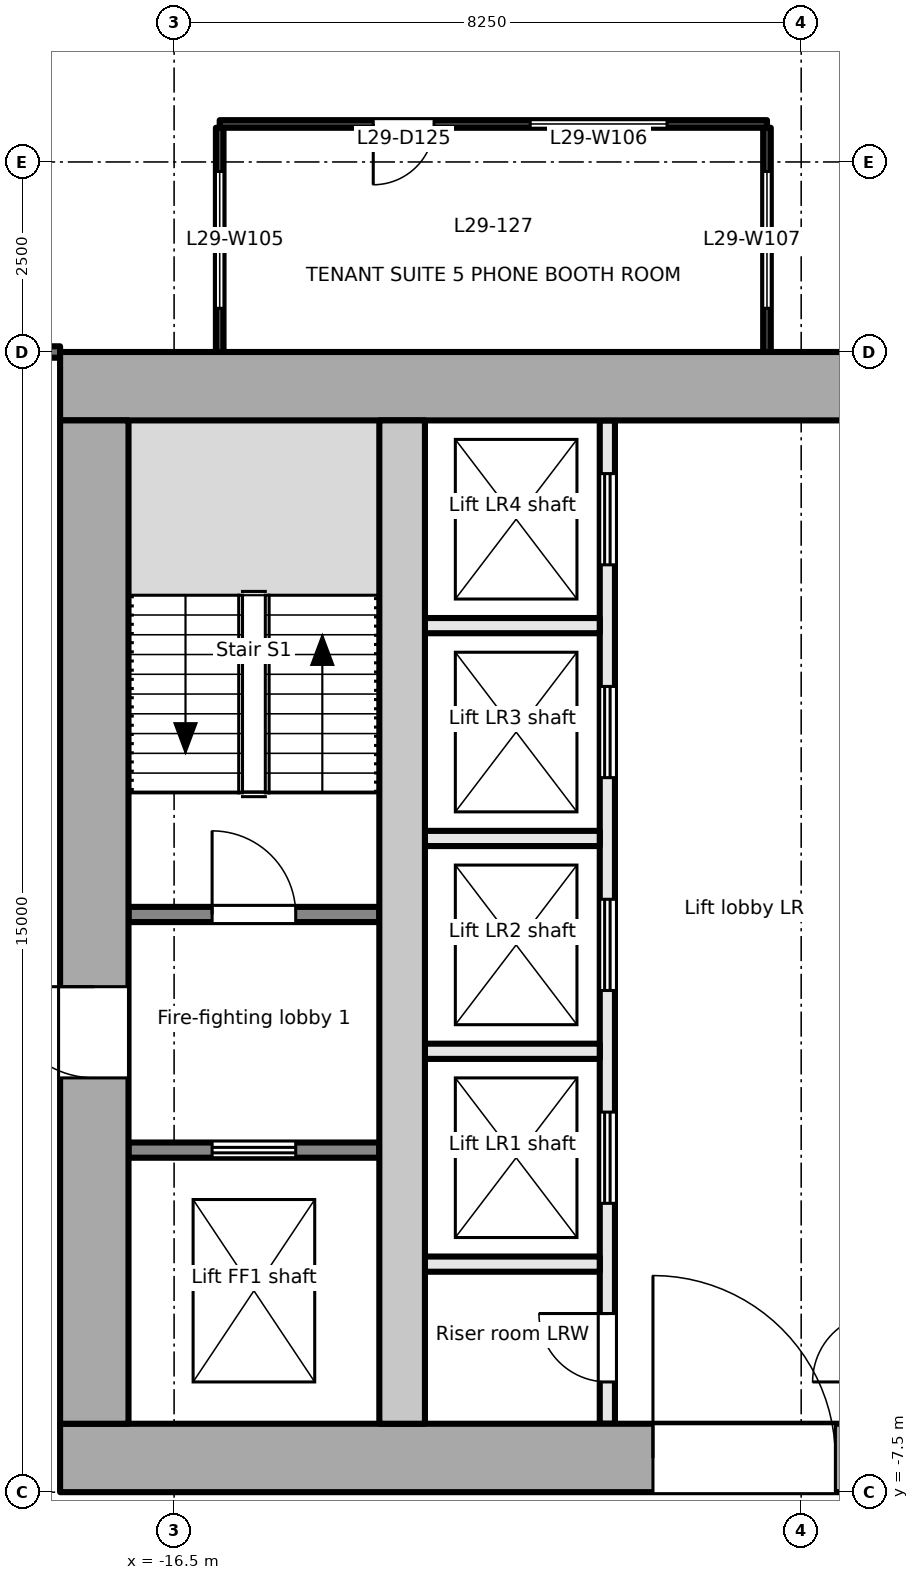
"""IFC4 building model, lengths in metres.
Left out: names, types, materials, properties, quantities, classifications, styles, units other than length and angle.
Written with IfcOpenShell. Run it as: python <this file> out.ifc"""

import sys

from ifc_helpers import new_model, si_unit, direction, frame, frame_2d, origin, place, context, subcontext, project, spatial, rectangle, extrude, element, fill, save


model = new_model("IFC4")
c1 = context("Model", 3, precision=1e-05, world=origin(), true_north=direction((0.0, 1.0)))
c2 = subcontext(c1, "Body", "Model", "MODEL_VIEW")
j1 = project(units=[si_unit("LENGTHUNIT", "METRE"), si_unit("PLANEANGLEUNIT", "RADIAN")], contexts=[c1])
p1 = place(None, origin())
s1 = spatial("IfcSite", under=j1, at=p1, CompositionType="ELEMENT")
p2 = place(p1, origin())
s2 = spatial("IfcBuilding", under=s1, at=p2, CompositionType="ELEMENT")
p3 = place(p2, frame((0.0, 0.0, 130.1)))
s3 = spatial("IfcBuildingStorey", under=s2, at=p3, CompositionType="ELEMENT", Elevation=130.1)
p4 = place(p3, frame((-18.0, -7.05, -0.2), z_axis=(0.0, 0.0, 1.0), x_axis=(1.0, 0.0, 0.0)))
e1 = element("IfcWall", 1, at=p4, inside=s3, PredefinedType="SHEAR", context=c2, shape_type="SweptSolid", body=[
    extrude(rectangle(XDim=36.0, YDim=0.9, at=frame_2d((18.0, 0.0))), origin(), (0.0, 0.0, 1.0), 4.0),
])
p5 = place(p4, frame((7.8, 0.0, 0.2)))
e2 = element("IfcOpeningElement", 2, at=p5, cuts=e1, PredefinedType="OPENING", context=c2, shape_type="SweptSolid", body=[
    extrude(rectangle(XDim=2.4, YDim=2.1, at=frame_2d((1.2, 1.05))), frame((0.0, 0.46, 0.0), z_axis=(0.0, -1.0, 0.0), x_axis=(1.0, 0.0, 0.0)), (0.0, 0.0, 1.0), 0.921),
])
p6 = place(p4, frame((17.4, 0.0, 0.2)))
e3 = element("IfcOpeningElement", 3, at=p6, cuts=e1, PredefinedType="OPENING", context=c2, shape_type="SweptSolid", body=[
    extrude(rectangle(XDim=1.2, YDim=2.1, at=frame_2d((0.6, 1.05))), frame((0.0, 0.46, 0.0), z_axis=(0.0, -1.0, 0.0), x_axis=(1.0, 0.0, 0.0)), (0.0, 0.0, 1.0), 0.921),
])
p7 = place(p4, frame((26.1, 0.0, 0.2)))
e4 = element("IfcOpeningElement", 4, at=p7, cuts=e1, PredefinedType="OPENING", context=c2, shape_type="SweptSolid", body=[
    extrude(rectangle(XDim=2.4, YDim=2.1, at=frame_2d((1.2, 1.05))), frame((0.0, 0.46, 0.0), z_axis=(0.0, -1.0, 0.0), x_axis=(1.0, 0.0, 0.0)), (0.0, 0.0, 1.0), 0.921),
])
p8 = place(p3, frame((-18.0, 7.05, -0.2), z_axis=(0.0, 0.0, 1.0), x_axis=(1.0, 0.0, 0.0)))
e5 = element("IfcWall", 5, at=p8, inside=s3, PredefinedType="SHEAR", context=c2, shape_type="SweptSolid", body=[
    extrude(rectangle(XDim=36.0, YDim=0.9, at=frame_2d((18.0, 0.0))), origin(), (0.0, 0.0, 1.0), 4.0),
])
p9 = place(p3, frame((-17.55, -6.6, -0.2), z_axis=(0.0, 0.0, 1.0), x_axis=(0.0, 1.0, 0.0)))
e6 = element("IfcWall", 6, at=p9, inside=s3, PredefinedType="SHEAR", context=c2, shape_type="SweptSolid", body=[
    extrude(rectangle(XDim=13.2, YDim=0.9, at=frame_2d((6.6, 0.0))), origin(), (0.0, 0.0, 1.0), 4.0),
])
p10 = place(p9, frame((4.55, 0.0, 0.2)))
e7 = element("IfcOpeningElement", 7, at=p10, cuts=e6, PredefinedType="OPENING", context=c2, shape_type="SweptSolid", body=[
    extrude(rectangle(XDim=1.2, YDim=2.1, at=frame_2d((0.6, 1.05))), frame((0.0, 0.46, 0.0), z_axis=(0.0, -1.0, 0.0), x_axis=(1.0, 0.0, 0.0)), (0.0, 0.0, 1.0), 0.921),
])
p11 = place(p3, frame((-13.5, -6.6, -0.2), z_axis=(0.0, 0.0, 1.0), x_axis=(0.0, 1.0, 0.0)))
e8 = element("IfcWall", 8, at=p11, inside=s3, PredefinedType="SHEAR", context=c2, shape_type="SweptSolid", body=[
    extrude(rectangle(XDim=13.2, YDim=0.6, at=frame_2d((6.6, 0.0))), origin(), (0.0, 0.0, 1.0), 4.0),
])
p12 = place(p3, frame((-17.1, -3.0, 0.0), z_axis=(0.0, 0.0, 1.0), x_axis=(1.0, 0.0, 0.0)))
e9 = element("IfcWall", 9, at=p12, inside=s3, PredefinedType="PARTITIONING", context=c2, shape_type="SweptSolid", body=[
    extrude(rectangle(XDim=3.3, YDim=0.2, at=frame_2d((1.65, 0.0))), origin(), (0.0, 0.0, 1.0), 3.8),
])
p13 = place(p12, frame((1.1, 0.0, 0.0)))
e10 = element("IfcOpeningElement", 10, at=p13, cuts=e9, PredefinedType="OPENING", context=c2, shape_type="SweptSolid", body=[
    extrude(rectangle(XDim=1.1, YDim=2.1, at=frame_2d((0.55, 1.05))), frame((0.0, 0.111, 0.0), z_axis=(0.0, -1.0, 0.0), x_axis=(1.0, 0.0, 0.0)), (0.0, 0.0, 1.0), 0.221),
])
p14 = place(p3, frame((-17.1, 0.1, 0.0), z_axis=(0.0, 0.0, 1.0), x_axis=(1.0, 0.0, 0.0)))
e11 = element("IfcWall", 11, at=p14, inside=s3, PredefinedType="PARTITIONING", context=c2, shape_type="SweptSolid", body=[
    extrude(rectangle(XDim=3.3, YDim=0.2, at=frame_2d((1.65, 0.0))), origin(), (0.0, 0.0, 1.0), 3.8),
])
p15 = place(p14, frame((1.1, 0.0, 0.0)))
e12 = element("IfcOpeningElement", 12, at=p15, cuts=e11, PredefinedType="OPENING", context=c2, shape_type="SweptSolid", body=[
    extrude(rectangle(XDim=1.1, YDim=2.1, at=frame_2d((0.55, 1.05))), frame((0.0, 0.111, 0.0), z_axis=(0.0, -1.0, 0.0), x_axis=(1.0, 0.0, 0.0)), (0.0, 0.0, 1.0), 0.221),
])
p16 = place(p3, frame((-10.8, -6.6, 0.0), z_axis=(0.0, 0.0, 1.0), x_axis=(0.0, 1.0, 0.0)))
e13 = element("IfcWall", 13, at=p16, inside=s3, PredefinedType="PARTITIONING", context=c2, shape_type="SweptSolid", body=[
    extrude(rectangle(XDim=13.2, YDim=0.2, at=frame_2d((6.6, 0.0))), origin(), (0.0, 0.0, 1.0), 3.8),
])
p17 = place(p16, frame((0.55, 0.0, 0.0)))
e14 = element("IfcOpeningElement", 14, at=p17, cuts=e13, PredefinedType="OPENING", context=c2, shape_type="SweptSolid", body=[
    extrude(rectangle(XDim=0.9, YDim=2.1, at=frame_2d((0.45, 1.05))), frame((0.0, 0.111, 0.0), z_axis=(0.0, -1.0, 0.0), x_axis=(1.0, 0.0, 0.0)), (0.0, 0.0, 1.0), 0.221),
])
p18 = place(p16, frame((2.9, 0.0, 0.0)))
e15 = element("IfcOpeningElement", 15, at=p18, cuts=e13, PredefinedType="OPENING", context=c2, shape_type="SweptSolid", body=[
    extrude(rectangle(XDim=1.2, YDim=2.1, at=frame_2d((0.6, 1.05))), frame((0.0, 0.111, 0.0), z_axis=(0.0, -1.0, 0.0), x_axis=(1.0, 0.0, 0.0)), (0.0, 0.0, 1.0), 0.221),
])
p19 = place(p16, frame((5.7, 0.0, 0.0)))
e16 = element("IfcOpeningElement", 16, at=p19, cuts=e13, PredefinedType="OPENING", context=c2, shape_type="SweptSolid", body=[
    extrude(rectangle(XDim=1.2, YDim=2.1, at=frame_2d((0.6, 1.05))), frame((0.0, 0.111, 0.0), z_axis=(0.0, -1.0, 0.0), x_axis=(1.0, 0.0, 0.0)), (0.0, 0.0, 1.0), 0.221),
])
p20 = place(p16, frame((8.5, 0.0, 0.0)))
e17 = element("IfcOpeningElement", 17, at=p20, cuts=e13, PredefinedType="OPENING", context=c2, shape_type="SweptSolid", body=[
    extrude(rectangle(XDim=1.2, YDim=2.1, at=frame_2d((0.6, 1.05))), frame((0.0, 0.111, 0.0), z_axis=(0.0, -1.0, 0.0), x_axis=(1.0, 0.0, 0.0)), (0.0, 0.0, 1.0), 0.221),
])
p21 = place(p16, frame((11.3, 0.0, 0.0)))
e18 = element("IfcOpeningElement", 18, at=p21, cuts=e13, PredefinedType="OPENING", context=c2, shape_type="SweptSolid", body=[
    extrude(rectangle(XDim=1.2, YDim=2.1, at=frame_2d((0.6, 1.05))), frame((0.0, 0.111, 0.0), z_axis=(0.0, -1.0, 0.0), x_axis=(1.0, 0.0, 0.0)), (0.0, 0.0, 1.0), 0.221),
])
for number, where, z_axis, x_axis in (
    (19, (-13.2, -1.7, 0.0), (0.0, 0.0, 1.0), (1.0, 0.0, 0.0)),
    (20, (-13.2, 1.1, 0.0), (0.0, 0.0, 1.0), (1.0, 0.0, 0.0)),
    (21, (-13.2, 3.9, 0.0), (0.0, 0.0, 1.0), (1.0, 0.0, 0.0)),
    (22, (-13.2, -4.5, 0.0), (0.0, 0.0, 1.0), (1.0, 0.0, 0.0)),
):
    element("IfcWall", number, at=place(p3, frame(where, z_axis=z_axis, x_axis=x_axis)), inside=s3, PredefinedType="PARTITIONING", context=c2, shape_type="SweptSolid", body=[
        extrude(rectangle(XDim=2.3, YDim=0.2, at=frame_2d((1.15, 0.0))), origin(), (0.0, 0.0, 1.0), 3.8),
    ])
p22 = place(p3, frame((-20.625, 7.5, 0.0), z_axis=(0.0, 0.0, 1.0), x_axis=(1.0, 0.0, 0.0)))
e23 = element("IfcWall", 23, at=p22, inside=s3, PredefinedType="PARTITIONING", context=c2, shape_type="SweptSolid", body=[
    extrude(rectangle(XDim=2.625, YDim=0.15, at=frame_2d((1.312, 0.0))), origin(), (0.0, 0.0, 1.0), 3.8),
])
p23 = place(p22, frame((0.556, 0.0, 0.0)))
e24 = element("IfcOpeningElement", 24, at=p23, cuts=e23, PredefinedType="OPENING", context=c2, shape_type="SweptSolid", body=[
    extrude(rectangle(XDim=0.9, YDim=2.1, at=frame_2d((0.45, 1.05))), frame((0.0, 0.085, 0.0), z_axis=(0.0, -1.0, 0.0), x_axis=(1.0, 0.0, 0.0)), (0.0, 0.0, 1.0), 0.171),
])
p24 = place(p3, frame((-15.9, 10.45, 0.0), z_axis=(0.0, 0.0, 1.0), x_axis=(0.0, -1.0, 0.0)))
e25 = element("IfcWall", 25, at=p24, inside=s3, PredefinedType="PARTITIONING", context=c2, shape_type="SweptSolid", body=[
    extrude(rectangle(XDim=2.95, YDim=0.1, at=frame_2d((1.475, 0.0))), origin(), (0.0, 0.0, 1.0), 3.8),
])
p25 = place(p24, frame((0.575, 0.0, 0.9)))
e26 = element("IfcOpeningElement", 26, at=p25, cuts=e25, PredefinedType="OPENING", context=c2, shape_type="SweptSolid", body=[
    extrude(rectangle(XDim=1.8, YDim=1.2, at=frame_2d((0.9, 0.6))), frame((0.0, 0.061, 0.0), z_axis=(0.0, -1.0, 0.0), x_axis=(1.0, 0.0, 0.0)), (0.0, 0.0, 1.0), 0.121),
])
p26 = place(p3, frame((-8.7, 10.5, 0.0), z_axis=(0.0, 0.0, 1.0), x_axis=(-1.0, 0.0, 0.0)))
e27 = element("IfcWall", 27, at=p26, inside=s3, PredefinedType="PARTITIONING", context=c2, shape_type="SweptSolid", body=[
    extrude(rectangle(XDim=7.2, YDim=0.1, at=frame_2d((3.6, 0.0))), origin(), (0.0, 0.0, 1.0), 3.5),
])
p27 = place(p26, frame((4.38, 0.0, 0.0)))
e28 = element("IfcOpeningElement", 28, at=p27, cuts=e27, PredefinedType="OPENING", context=c2, shape_type="SweptSolid", body=[
    extrude(rectangle(XDim=0.8, YDim=2.1, at=frame_2d((0.4, 1.05))), frame((0.0, 0.061, 0.0), z_axis=(0.0, -1.0, 0.0), x_axis=(1.0, 0.0, 0.0)), (0.0, 0.0, 1.0), 0.121),
])
p28 = place(p26, frame((1.315, 0.0, 0.9)))
e29 = element("IfcOpeningElement", 29, at=p28, cuts=e27, PredefinedType="OPENING", context=c2, shape_type="SweptSolid", body=[
    extrude(rectangle(XDim=1.8, YDim=1.2, at=frame_2d((0.9, 0.6))), frame((0.0, 0.061, 0.0), z_axis=(0.0, -1.0, 0.0), x_axis=(1.0, 0.0, 0.0)), (0.0, 0.0, 1.0), 0.121),
])
p29 = place(p3, frame((-8.7, 7.5, 0.0), z_axis=(0.0, 0.0, 1.0), x_axis=(0.0, 1.0, 0.0)))
e30 = element("IfcWall", 30, at=p29, inside=s3, PredefinedType="PARTITIONING", context=c2, shape_type="SweptSolid", body=[
    extrude(rectangle(XDim=2.95, YDim=0.1, at=frame_2d((1.475, 0.0))), origin(), (0.0, 0.0, 1.0), 3.8),
])
p30 = place(p29, frame((0.575, 0.0, 0.9)))
e31 = element("IfcOpeningElement", 31, at=p30, cuts=e30, PredefinedType="OPENING", context=c2, shape_type="SweptSolid", body=[
    extrude(rectangle(XDim=1.8, YDim=1.2, at=frame_2d((0.9, 0.6))), frame((0.0, 0.061, 0.0), z_axis=(0.0, -1.0, 0.0), x_axis=(1.0, 0.0, 0.0)), (0.0, 0.0, 1.0), 0.121),
])
p31 = place(p13, origin())
e32 = element("IfcDoor", 32, at=p31, inside=s3, OperationType="DOUBLE_DOOR_SLIDING", PredefinedType="DOOR", context=c2, shape_type="SweptSolid", body=[
    extrude(rectangle(XDim=1.1, YDim=2.1, at=frame_2d((0.55, 1.05))), frame((0.0, 0.025, 0.0), z_axis=(0.0, -1.0, 0.0), x_axis=(1.0, 0.0, 0.0)), (0.0, 0.0, 1.0), 0.05),
])
fill(e10, e32)
p32 = place(p10, origin())
e33 = element("IfcDoor", 33, at=p32, inside=s3, OperationType="SINGLE_SWING_RIGHT", PredefinedType="DOOR", context=c2, shape_type="SweptSolid", body=[
    extrude(rectangle(XDim=1.2, YDim=2.1, at=frame_2d((0.6, 1.05))), frame((0.0, 0.025, 0.0), z_axis=(0.0, -1.0, 0.0), x_axis=(1.0, 0.0, 0.0)), (0.0, 0.0, 1.0), 0.05),
])
fill(e7, e33)
p33 = place(p15, origin())
e34 = element("IfcDoor", 34, at=p33, inside=s3, OperationType="SINGLE_SWING_LEFT", PredefinedType="DOOR", context=c2, shape_type="SweptSolid", body=[
    extrude(rectangle(XDim=1.1, YDim=2.1, at=frame_2d((0.55, 1.05))), frame((0.0, 0.025, 0.0), z_axis=(0.0, -1.0, 0.0), x_axis=(1.0, 0.0, 0.0)), (0.0, 0.0, 1.0), 0.05),
])
fill(e12, e34)
p34 = place(p17, origin())
e35 = element("IfcDoor", 35, at=p34, inside=s3, OperationType="SINGLE_SWING_RIGHT", PredefinedType="DOOR", context=c2, shape_type="SweptSolid", body=[
    extrude(rectangle(XDim=0.9, YDim=2.1, at=frame_2d((0.45, 1.05))), frame((0.0, 0.025, 0.0), z_axis=(0.0, -1.0, 0.0), x_axis=(1.0, 0.0, 0.0)), (0.0, 0.0, 1.0), 0.05),
])
fill(e14, e35)
p35 = place(p18, origin())
e36 = element("IfcDoor", 36, at=p35, inside=s3, OperationType="DOUBLE_DOOR_SLIDING", PredefinedType="DOOR", context=c2, shape_type="SweptSolid", body=[
    extrude(rectangle(XDim=1.2, YDim=2.1, at=frame_2d((0.6, 1.05))), frame((0.0, 0.025, 0.0), z_axis=(0.0, -1.0, 0.0), x_axis=(1.0, 0.0, 0.0)), (0.0, 0.0, 1.0), 0.05),
])
fill(e15, e36)
p36 = place(p19, origin())
e37 = element("IfcDoor", 37, at=p36, inside=s3, OperationType="DOUBLE_DOOR_SLIDING", PredefinedType="DOOR", context=c2, shape_type="SweptSolid", body=[
    extrude(rectangle(XDim=1.2, YDim=2.1, at=frame_2d((0.6, 1.05))), frame((0.0, 0.025, 0.0), z_axis=(0.0, -1.0, 0.0), x_axis=(1.0, 0.0, 0.0)), (0.0, 0.0, 1.0), 0.05),
])
fill(e16, e37)
p37 = place(p20, origin())
e38 = element("IfcDoor", 38, at=p37, inside=s3, OperationType="DOUBLE_DOOR_SLIDING", PredefinedType="DOOR", context=c2, shape_type="SweptSolid", body=[
    extrude(rectangle(XDim=1.2, YDim=2.1, at=frame_2d((0.6, 1.05))), frame((0.0, 0.025, 0.0), z_axis=(0.0, -1.0, 0.0), x_axis=(1.0, 0.0, 0.0)), (0.0, 0.0, 1.0), 0.05),
])
fill(e17, e38)
p38 = place(p21, origin())
e39 = element("IfcDoor", 39, at=p38, inside=s3, OperationType="DOUBLE_DOOR_SLIDING", PredefinedType="DOOR", context=c2, shape_type="SweptSolid", body=[
    extrude(rectangle(XDim=1.2, YDim=2.1, at=frame_2d((0.6, 1.05))), frame((0.0, 0.025, 0.0), z_axis=(0.0, -1.0, 0.0), x_axis=(1.0, 0.0, 0.0)), (0.0, 0.0, 1.0), 0.05),
])
fill(e18, e39)
p39 = place(p5, origin())
e40 = element("IfcDoor", 40, at=p39, inside=s3, OperationType="DOUBLE_DOOR_DOUBLE_SWING", PredefinedType="DOOR", context=c2, shape_type="SweptSolid", body=[
    extrude(rectangle(XDim=2.4, YDim=2.1, at=frame_2d((1.2, 1.05))), frame((0.0, 0.025, 0.0), z_axis=(0.0, -1.0, 0.0), x_axis=(1.0, 0.0, 0.0)), (0.0, 0.0, 1.0), 0.05),
])
fill(e2, e40)
p40 = place(p27, origin())
e41 = element("IfcDoor", 41, at=p40, inside=s3, OperationType="SINGLE_SWING_RIGHT", PredefinedType="DOOR", context=c2, shape_type="SweptSolid", body=[
    extrude(rectangle(XDim=0.8, YDim=2.1, at=frame_2d((0.4, 1.05))), frame((0.0, 0.025, 0.0), z_axis=(0.0, -1.0, 0.0), x_axis=(1.0, 0.0, 0.0)), (0.0, 0.0, 1.0), 0.05),
])
fill(e28, e41)
p41 = place(p25, origin())
e42 = element("IfcWindow", 42, at=p41, inside=s3, PartitioningType="SINGLE_PANEL", PredefinedType="WINDOW", context=c2, shape_type="SweptSolid", body=[
    extrude(rectangle(XDim=1.8, YDim=1.2, at=frame_2d((0.9, 0.6))), frame((0.0, 0.03, 0.0), z_axis=(0.0, -1.0, 0.0), x_axis=(1.0, 0.0, 0.0)), (0.0, 0.0, 1.0), 0.06),
])
fill(e26, e42)
p42 = place(p28, origin())
e43 = element("IfcWindow", 43, at=p42, inside=s3, PartitioningType="SINGLE_PANEL", PredefinedType="WINDOW", context=c2, shape_type="SweptSolid", body=[
    extrude(rectangle(XDim=1.8, YDim=1.2, at=frame_2d((0.9, 0.6))), frame((0.0, 0.03, 0.0), z_axis=(0.0, -1.0, 0.0), x_axis=(1.0, 0.0, 0.0)), (0.0, 0.0, 1.0), 0.06),
])
fill(e29, e43)
p43 = place(p30, origin())
e44 = element("IfcWindow", 44, at=p43, inside=s3, PartitioningType="SINGLE_PANEL", PredefinedType="WINDOW", context=c2, shape_type="SweptSolid", body=[
    extrude(rectangle(XDim=1.8, YDim=1.2, at=frame_2d((0.9, 0.6))), frame((0.0, 0.03, 0.0), z_axis=(0.0, -1.0, 0.0), x_axis=(1.0, 0.0, 0.0)), (0.0, 0.0, 1.0), 0.06),
])
fill(e31, e44)
save(model, sys.argv[1])
